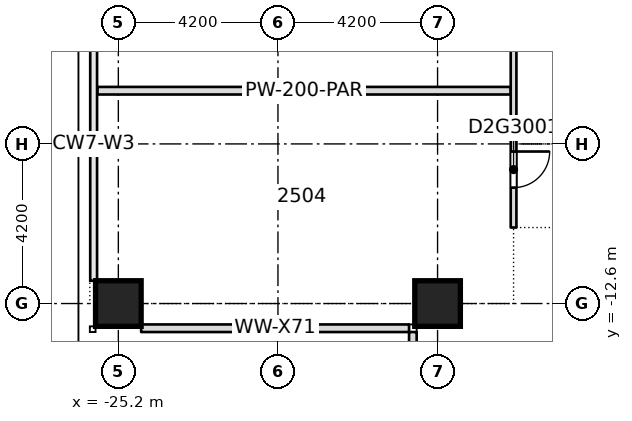
"""IFC4 building model, lengths in metres.
Left out: names, types, materials, properties, quantities, classifications, styles, units other than length and angle.
Written with IfcOpenShell. Run it as: python <this file> out.ifc"""

import sys

from ifc_helpers import new_model, si_unit, direction, frame, frame_2d, origin, origin_2d, place, context, subcontext, project, spatial, rectangle, extrude, element, fill, save


model = new_model("IFC4")
c1 = context("Model", 3, precision=1e-05, world=origin(), true_north=direction((0.0, 1.0)))
c2 = subcontext(c1, "Body", "Model", "MODEL_VIEW")
j1 = project(units=[si_unit("LENGTHUNIT", "METRE"), si_unit("PLANEANGLEUNIT", "RADIAN")], contexts=[c1])
p1 = place(None, origin())
s1 = spatial("IfcSite", under=j1, at=p1, CompositionType="ELEMENT")
p2 = place(p1, origin())
s2 = spatial("IfcBuilding", under=s1, at=p2, CompositionType="ELEMENT")
p3 = place(p2, frame((0.0, 0.0, 101.1)))
s3 = spatial("IfcBuildingStorey", under=s2, at=p3, CompositionType="ELEMENT", Elevation=101.1)
for number, where, z_axis, x_axis in (
    (1, (-25.2, -12.6, -0.32), (0.0, 0.0, 1.0), (1.0, 0.0, 0.0)),
    (2, (-16.8, -12.6, -0.32), (0.0, 0.0, 1.0), (1.0, 0.0, 0.0)),
):
    element("IfcColumn", number, at=place(p3, frame(where, z_axis=z_axis, x_axis=x_axis)), inside=s3, PredefinedType="COLUMN", context=c2, shape_type="SweptSolid", body=[
        extrude(rectangle(XDim=1.2, YDim=1.2, at=origin_2d()), origin(), (0.0, 0.0, 1.0), 3.45),
    ])
p4 = place(p3, frame((-25.75, -7.0, 0.0), z_axis=(0.0, 0.0, 1.0), x_axis=(1.0, 0.0, 0.0)))
e3 = element("IfcWall", 3, at=p4, inside=s3, PredefinedType="PARTITIONING", context=c2, shape_type="SweptSolid", body=[
    extrude(rectangle(XDim=10.875, YDim=0.2, at=frame_2d((5.438, 0.0))), origin(), (0.0, 0.0, 1.0), 3.13),
])
p5 = place(p3, frame((-14.8, -10.6, 0.0), z_axis=(0.0, 0.0, 1.0), x_axis=(0.0, 1.0, 0.0)))
e4 = element("IfcWall", 4, at=p5, inside=s3, PredefinedType="PARTITIONING", context=c2, shape_type="SweptSolid", body=[
    extrude(rectangle(XDim=32.15, YDim=0.15, at=frame_2d((16.075, 0.0))), origin(), (0.0, 0.0, 1.0), 3.13),
])
p6 = place(p5, frame((1.05, 0.0, 0.0)))
e5 = element("IfcOpeningElement", 5, at=p6, cuts=e4, PredefinedType="OPENING", context=c2, shape_type="SweptSolid", body=[
    extrude(rectangle(XDim=0.95, YDim=2.1, at=frame_2d((0.475, 1.05))), frame((0.0, 0.085, 0.0), z_axis=(0.0, -1.0, 0.0), x_axis=(1.0, 0.0, 0.0)), (0.0, 0.0, 1.0), 0.17),
])
p7 = place(p5, frame((16.1, 0.0, 0.0)))
e6 = element("IfcOpeningElement", 6, at=p7, cuts=e4, PredefinedType="OPENING", context=c2, shape_type="SweptSolid", body=[
    extrude(rectangle(XDim=1.0, YDim=2.1, at=frame_2d((0.5, 1.05))), frame((0.0, 0.085, 0.0), z_axis=(0.0, -1.0, 0.0), x_axis=(1.0, 0.0, 0.0)), (0.0, 0.0, 1.0), 0.17),
])
p8 = place(p5, frame((21.1, 0.0, 0.0)))
e7 = element("IfcOpeningElement", 7, at=p8, cuts=e4, PredefinedType="OPENING", context=c2, shape_type="SweptSolid", body=[
    extrude(rectangle(XDim=0.95, YDim=2.1, at=frame_2d((0.475, 1.05))), frame((0.0, 0.085, 0.0), z_axis=(0.0, -1.0, 0.0), x_axis=(1.0, 0.0, 0.0)), (0.0, 0.0, 1.0), 0.17),
])
p9 = place(p5, frame((25.55, 0.0, 0.0)))
e8 = element("IfcOpeningElement", 8, at=p9, cuts=e4, PredefinedType="OPENING", context=c2, shape_type="SweptSolid", body=[
    extrude(rectangle(XDim=0.95, YDim=2.1, at=frame_2d((0.475, 1.05))), frame((0.0, 0.085, 0.0), z_axis=(0.0, -1.0, 0.0), x_axis=(1.0, 0.0, 0.0)), (0.0, 0.0, 1.0), 0.17),
])
p10 = place(p5, frame((29.45, 0.0, 0.0)))
e9 = element("IfcOpeningElement", 9, at=p10, cuts=e4, PredefinedType="OPENING", context=c2, shape_type="SweptSolid", body=[
    extrude(rectangle(XDim=0.95, YDim=2.1, at=frame_2d((0.475, 1.05))), frame((0.0, 0.085, 0.0), z_axis=(0.0, -1.0, 0.0), x_axis=(1.0, 0.0, 0.0)), (0.0, 0.0, 1.0), 0.17),
])
p11 = place(p5, frame((10.05, 0.0, 0.0)))
e10 = element("IfcOpeningElement", 10, at=p11, cuts=e4, PredefinedType="OPENING", context=c2, shape_type="SweptSolid", body=[
    extrude(rectangle(XDim=1.1, YDim=2.1, at=frame_2d((0.55, 1.05))), frame((0.0, 0.085, 0.0), z_axis=(0.0, -1.0, 0.0), x_axis=(1.0, 0.0, 0.0)), (0.0, 0.0, 1.0), 0.17),
])
p12 = place(p5, frame((4.85, 0.0, 0.0)))
e11 = element("IfcOpeningElement", 11, at=p12, cuts=e4, PredefinedType="OPENING", context=c2, shape_type="SweptSolid", body=[
    extrude(rectangle(XDim=1.0, YDim=2.1, at=frame_2d((0.5, 1.05))), frame((0.0, 0.085, 0.0), z_axis=(0.0, -1.0, 0.0), x_axis=(1.0, 0.0, 0.0)), (0.0, 0.0, 1.0), 0.17),
])
p13 = place(p3, frame((-24.6, -13.25, 0.0), z_axis=(0.0, 0.0, 1.0), x_axis=(1.0, 0.0, 0.0)))
e12 = element("IfcWall", 12, at=p13, inside=s3, PredefinedType="STANDARD", context=c2, shape_type="SweptSolid", body=[
    extrude(rectangle(XDim=7.05, YDim=0.2, at=frame_2d((3.525, 0.0))), origin(), (0.0, 0.0, 1.0), 3.13),
])
p14 = place(p3, frame((-17.45, -13.35, 0.0), z_axis=(0.0, 0.0, 1.0), x_axis=(0.0, -1.0, 0.0)))
e13 = element("IfcWall", 13, at=p14, inside=s3, PredefinedType="STANDARD", context=c2, shape_type="SweptSolid", body=[
    extrude(rectangle(XDim=7.05, YDim=0.2, at=frame_2d((3.525, 0.0))), origin(), (0.0, 0.0, 1.0), 3.13),
])
p15 = place(p14, frame((3.8, 0.0, 0.2)))
e14 = element("IfcOpeningElement", 14, at=p15, cuts=e13, PredefinedType="OPENING", context=c2, shape_type="SweptSolid", body=[
    extrude(rectangle(XDim=1.8, YDim=2.65, at=frame_2d((0.9, 1.325))), frame((0.0, 0.11, 0.0), z_axis=(0.0, -1.0, 0.0), x_axis=(1.0, 0.0, 0.0)), (0.0, 0.0, 1.0), 0.22),
])
p16 = place(p14, frame((0.275, 0.0, 0.2)))
e15 = element("IfcOpeningElement", 15, at=p16, cuts=e13, PredefinedType="OPENING", context=c2, shape_type="SweptSolid", body=[
    extrude(rectangle(XDim=1.8, YDim=2.65, at=frame_2d((0.9, 1.325))), frame((0.0, 0.11, 0.0), z_axis=(0.0, -1.0, 0.0), x_axis=(1.0, 0.0, 0.0)), (0.0, 0.0, 1.0), 0.22),
])
p17 = place(p6, origin())
e16 = element("IfcDoor", 16, at=p17, inside=s3, OperationType="SINGLE_SWING_LEFT", PredefinedType="DOOR", context=c2, shape_type="SweptSolid", body=[
    extrude(rectangle(XDim=0.95, YDim=2.1, at=frame_2d((0.475, 1.05))), frame((0.0, 0.025, 0.0), z_axis=(0.0, -1.0, 0.0), x_axis=(1.0, 0.0, 0.0)), (0.0, 0.0, 1.0), 0.05),
])
fill(e5, e16)
save(model, sys.argv[1])
